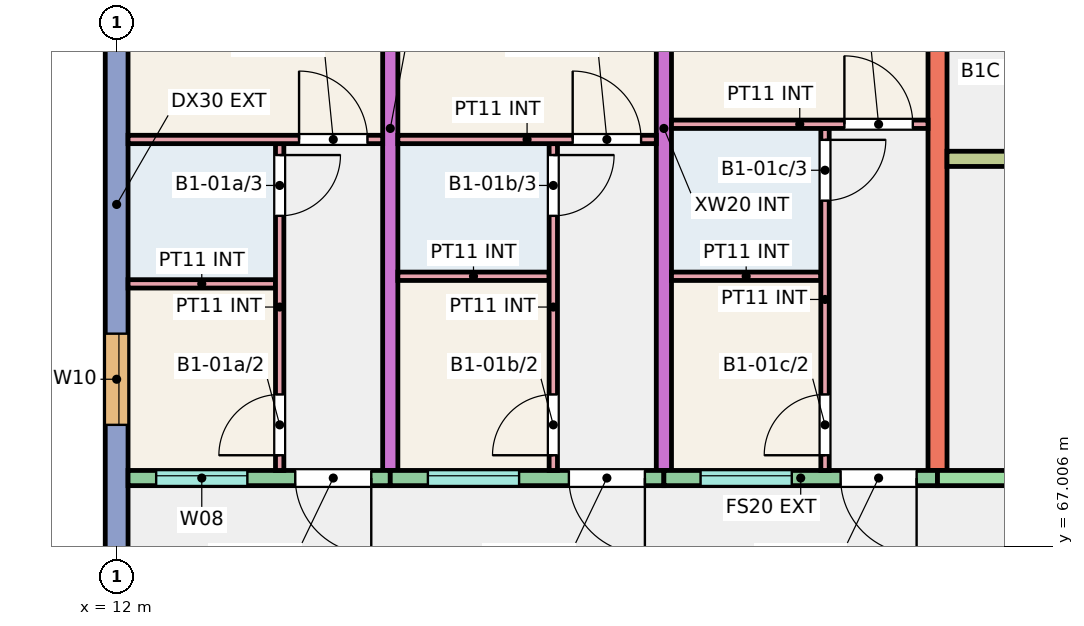
"""IFC4 building model, lengths in metres.
Left out: names, types, materials, properties, quantities, classifications, styles, units other than length and angle.
Written with IfcOpenShell. Run it as: python <this file> out.ifc"""

import sys

from ifc_helpers import new_model, si_unit, direction, frame, frame_2d, origin, place, context, subcontext, project, spatial, rectangle, extrude, element, fill, save


model = new_model("IFC4")
c1 = context("Model", 3, precision=1e-05, world=origin(), true_north=direction((0.0, 1.0)))
c2 = subcontext(c1, "Body", "Model", "MODEL_VIEW")
j1 = project(units=[si_unit("LENGTHUNIT", "METRE"), si_unit("PLANEANGLEUNIT", "RADIAN")], contexts=[c1])
p1 = place(None, origin())
s1 = spatial("IfcSite", under=j1, at=p1, CompositionType="ELEMENT")
p2 = place(p1, origin())
s2 = spatial("IfcBuilding", under=s1, at=p2, CompositionType="ELEMENT")
p3 = place(p2, frame((0.0, 0.0, 3.0)))
s3 = spatial("IfcBuildingStorey", under=s2, at=p3, CompositionType="ELEMENT", Elevation=3.0)
p4 = place(p3, frame((12.0, 66.0, 0.0), z_axis=(0.0, 0.0, 1.0), x_axis=(0.0, 1.0, 0.0)))
e1 = element("IfcWall", 1, at=p4, inside=s3, PredefinedType="SHEAR", context=c2, shape_type="SweptSolid", body=[
    extrude(rectangle(XDim=11.0, YDim=0.3, at=frame_2d((5.5, 0.0))), origin(), (0.0, 0.0, 1.0), 3.0),
])
p5 = place(p4, frame((2.6, 0.0, 0.9)))
e2 = element("IfcOpeningElement", 2, at=p5, cuts=e1, PredefinedType="OPENING", context=c2, shape_type="SweptSolid", body=[
    extrude(rectangle(XDim=1.2, YDim=1.5, at=frame_2d((0.6, 0.75))), frame((0.0, 0.16, 0.0), z_axis=(0.0, -1.0, 0.0), x_axis=(1.0, 0.0, 0.0)), (0.0, 0.0, 1.0), 0.32),
])
p6 = place(p4, frame((7.805, 0.0, 0.9)))
e3 = element("IfcOpeningElement", 3, at=p6, cuts=e1, PredefinedType="OPENING", context=c2, shape_type="SweptSolid", body=[
    extrude(rectangle(XDim=1.8, YDim=1.5, at=frame_2d((0.9, 0.75))), frame((0.0, 0.16, 0.0), z_axis=(0.0, -1.0, 0.0), x_axis=(1.0, 0.0, 0.0)), (0.0, 0.0, 1.0), 0.32),
])
for number, where, z_axis, x_axis in (
    (4, (15.6, 68.0, 0.0), (0.0, 0.0, 1.0), (0.0, 1.0, 0.0)),
    (5, (19.2, 68.0, 0.0), (0.0, 0.0, 1.0), (0.0, 1.0, 0.0)),
):
    element("IfcWall", number, at=place(p3, frame(where, z_axis=z_axis, x_axis=x_axis)), inside=s3, PredefinedType="SHEAR", context=c2, shape_type="SweptSolid", body=[
        extrude(rectangle(XDim=9.0, YDim=0.2, at=frame_2d((4.5, 0.0))), origin(), (0.0, 0.0, 1.0), 3.0),
    ])
p7 = place(p3, frame((22.8, 68.0, 0.0), z_axis=(0.0, 0.0, 1.0), x_axis=(0.0, 1.0, 0.0)))
e6 = element("IfcWall", 6, at=p7, inside=s3, PredefinedType="SHEAR", context=c2, shape_type="SweptSolid", body=[
    extrude(rectangle(XDim=9.0, YDim=0.25, at=frame_2d((4.5, 0.0))), origin(), (0.0, 0.0, 1.0), 3.0),
])
p8 = place(p3, frame((12.15, 67.9, 0.0), z_axis=(0.0, 0.0, 1.0), x_axis=(1.0, 0.0, 0.0)))
e7 = element("IfcWall", 7, at=p8, inside=s3, PredefinedType="SOLIDWALL", context=c2, shape_type="SweptSolid", body=[
    extrude(rectangle(XDim=3.45, YDim=0.2, at=frame_2d((1.725, 0.0))), origin(), (0.0, 0.0, 1.0), 3.0),
])
p9 = place(p8, frame((0.37, 0.0, 1.1)))
e8 = element("IfcOpeningElement", 8, at=p9, cuts=e7, PredefinedType="OPENING", context=c2, shape_type="SweptSolid", body=[
    extrude(rectangle(XDim=1.2, YDim=1.3, at=frame_2d((0.6, 0.65))), frame((0.0, 0.11, 0.0), z_axis=(0.0, -1.0, 0.0), x_axis=(1.0, 0.0, 0.0)), (0.0, 0.0, 1.0), 0.22),
])
p10 = place(p8, frame((2.2, 0.0, 0.0)))
e9 = element("IfcOpeningElement", 9, at=p10, cuts=e7, PredefinedType="OPENING", context=c2, shape_type="SweptSolid", body=[
    extrude(rectangle(XDim=1.0, YDim=2.1, at=frame_2d((0.5, 1.05))), frame((0.0, 0.11, 0.0), z_axis=(0.0, -1.0, 0.0), x_axis=(1.0, 0.0, 0.0)), (0.0, 0.0, 1.0), 0.22),
])
p11 = place(p3, frame((15.6, 67.9, 0.0), z_axis=(0.0, 0.0, 1.0), x_axis=(1.0, 0.0, 0.0)))
e10 = element("IfcWall", 10, at=p11, inside=s3, PredefinedType="SOLIDWALL", context=c2, shape_type="SweptSolid", body=[
    extrude(rectangle(XDim=3.6, YDim=0.2, at=frame_2d((1.8, 0.0))), origin(), (0.0, 0.0, 1.0), 3.0),
])
p12 = place(p11, frame((0.495, 0.0, 1.1)))
e11 = element("IfcOpeningElement", 11, at=p12, cuts=e10, PredefinedType="OPENING", context=c2, shape_type="SweptSolid", body=[
    extrude(rectangle(XDim=1.2, YDim=1.3, at=frame_2d((0.6, 0.65))), frame((0.0, 0.11, 0.0), z_axis=(0.0, -1.0, 0.0), x_axis=(1.0, 0.0, 0.0)), (0.0, 0.0, 1.0), 0.22),
])
p13 = place(p11, frame((2.35, 0.0, 0.0)))
e12 = element("IfcOpeningElement", 12, at=p13, cuts=e10, PredefinedType="OPENING", context=c2, shape_type="SweptSolid", body=[
    extrude(rectangle(XDim=1.0, YDim=2.1, at=frame_2d((0.5, 1.05))), frame((0.0, 0.11, 0.0), z_axis=(0.0, -1.0, 0.0), x_axis=(1.0, 0.0, 0.0)), (0.0, 0.0, 1.0), 0.22),
])
p14 = place(p3, frame((19.2, 67.9, 0.0), z_axis=(0.0, 0.0, 1.0), x_axis=(1.0, 0.0, 0.0)))
e13 = element("IfcWall", 13, at=p14, inside=s3, PredefinedType="SOLIDWALL", context=c2, shape_type="SweptSolid", body=[
    extrude(rectangle(XDim=3.6, YDim=0.2, at=frame_2d((1.8, 0.0))), origin(), (0.0, 0.0, 1.0), 3.0),
])
p15 = place(p14, frame((0.482, 0.0, 1.1)))
e14 = element("IfcOpeningElement", 14, at=p15, cuts=e13, PredefinedType="OPENING", context=c2, shape_type="SweptSolid", body=[
    extrude(rectangle(XDim=1.2, YDim=1.3, at=frame_2d((0.6, 0.65))), frame((0.0, 0.11, 0.0), z_axis=(0.0, -1.0, 0.0), x_axis=(1.0, 0.0, 0.0)), (0.0, 0.0, 1.0), 0.22),
])
p16 = place(p14, frame((2.325, 0.0, 0.0)))
e15 = element("IfcOpeningElement", 15, at=p16, cuts=e13, PredefinedType="OPENING", context=c2, shape_type="SweptSolid", body=[
    extrude(rectangle(XDim=1.0, YDim=2.1, at=frame_2d((0.5, 1.05))), frame((0.0, 0.11, 0.0), z_axis=(0.0, -1.0, 0.0), x_axis=(1.0, 0.0, 0.0)), (0.0, 0.0, 1.0), 0.22),
])
p17 = place(p3, frame((22.8, 67.9, 0.0), z_axis=(0.0, 0.0, 1.0), x_axis=(1.0, 0.0, 0.0)))
e16 = element("IfcWall", 16, at=p17, inside=s3, PredefinedType="SHEAR", context=c2, shape_type="SweptSolid", body=[
    extrude(rectangle(XDim=5.85, YDim=0.2, at=frame_2d((2.925, 0.0))), origin(), (0.0, 0.0, 1.0), 3.0),
])
p18 = place(p17, frame((2.438, 0.0, 0.0)))
e17 = element("IfcOpeningElement", 17, at=p18, cuts=e16, PredefinedType="OPENING", context=c2, shape_type="SweptSolid", body=[
    extrude(rectangle(XDim=1.1, YDim=2.1, at=frame_2d((0.55, 1.05))), frame((0.0, 0.11, 0.0), z_axis=(0.0, -1.0, 0.0), x_axis=(1.0, 0.0, 0.0)), (0.0, 0.0, 1.0), 0.22),
])
p19 = place(p3, frame((22.925, 72.1, 0.0), z_axis=(0.0, 0.0, 1.0), x_axis=(1.0, 0.0, 0.0)))
e18 = element("IfcWall", 18, at=p19, inside=s3, PredefinedType="SHEAR", context=c2, shape_type="SweptSolid", body=[
    extrude(rectangle(XDim=5.725, YDim=0.2, at=frame_2d((2.862, 0.0))), origin(), (0.0, 0.0, 1.0), 3.0),
])
p20 = place(p19, frame((0.95, 0.0, 0.0)))
e19 = element("IfcOpeningElement", 19, at=p20, cuts=e18, PredefinedType="OPENING", context=c2, shape_type="SweptSolid", body=[
    extrude(rectangle(XDim=1.0, YDim=2.1, at=frame_2d((0.5, 1.05))), frame((0.0, 0.11, 0.0), z_axis=(0.0, -1.0, 0.0), x_axis=(1.0, 0.0, 0.0)), (0.0, 0.0, 1.0), 0.22),
])
p21 = place(p19, frame((3.863, 0.0, 0.0)))
e20 = element("IfcOpeningElement", 20, at=p21, cuts=e18, PredefinedType="OPENING", context=c2, shape_type="SweptSolid", body=[
    extrude(rectangle(XDim=1.1, YDim=2.1, at=frame_2d((0.55, 1.05))), frame((0.0, 0.11, 0.0), z_axis=(0.0, -1.0, 0.0), x_axis=(1.0, 0.0, 0.0)), (0.0, 0.0, 1.0), 0.22),
])
p22 = place(p3, frame((12.15, 70.455, 0.0), z_axis=(0.0, 0.0, 1.0), x_axis=(1.0, 0.0, 0.0)))
e21 = element("IfcWall", 21, at=p22, inside=s3, PredefinedType="PARTITIONING", context=c2, shape_type="SweptSolid", body=[
    extrude(rectangle(XDim=1.94, YDim=0.11, at=frame_2d((0.97, 0.0))), origin(), (0.0, 0.0, 1.0), 2.8),
])
p23 = place(p3, frame((14.145, 68.0, 0.0), z_axis=(0.0, 0.0, 1.0), x_axis=(0.0, 1.0, 0.0)))
e22 = element("IfcWall", 22, at=p23, inside=s3, PredefinedType="PARTITIONING", context=c2, shape_type="SweptSolid", body=[
    extrude(rectangle(XDim=4.3, YDim=0.11, at=frame_2d((2.15, 0.0))), origin(), (0.0, 0.0, 1.0), 2.8),
])
p24 = place(p23, frame((0.2, 0.0, 0.0)))
e23 = element("IfcOpeningElement", 23, at=p24, cuts=e22, PredefinedType="OPENING", context=c2, shape_type="SweptSolid", body=[
    extrude(rectangle(XDim=0.8, YDim=2.1, at=frame_2d((0.4, 1.05))), frame((0.0, 0.065, 0.0), z_axis=(0.0, -1.0, 0.0), x_axis=(1.0, 0.0, 0.0)), (0.0, 0.0, 1.0), 0.13),
])
p25 = place(p23, frame((3.35, 0.0, 0.0)))
e24 = element("IfcOpeningElement", 24, at=p25, cuts=e22, PredefinedType="OPENING", context=c2, shape_type="SweptSolid", body=[
    extrude(rectangle(XDim=0.8, YDim=2.1, at=frame_2d((0.4, 1.05))), frame((0.0, 0.065, 0.0), z_axis=(0.0, -1.0, 0.0), x_axis=(1.0, 0.0, 0.0)), (0.0, 0.0, 1.0), 0.13),
])
p26 = place(p3, frame((12.15, 72.355, 0.0), z_axis=(0.0, 0.0, 1.0), x_axis=(1.0, 0.0, 0.0)))
e25 = element("IfcWall", 25, at=p26, inside=s3, PredefinedType="PARTITIONING", context=c2, shape_type="SweptSolid", body=[
    extrude(rectangle(XDim=3.35, YDim=0.11, at=frame_2d((1.675, 0.0))), origin(), (0.0, 0.0, 1.0), 2.8),
])
p27 = place(p26, frame((2.25, 0.0, 0.0)))
e26 = element("IfcOpeningElement", 26, at=p27, cuts=e25, PredefinedType="OPENING", context=c2, shape_type="SweptSolid", body=[
    extrude(rectangle(XDim=0.9, YDim=2.1, at=frame_2d((0.45, 1.05))), frame((0.0, 0.065, 0.0), z_axis=(0.0, -1.0, 0.0), x_axis=(1.0, 0.0, 0.0)), (0.0, 0.0, 1.0), 0.13),
])
p28 = place(p3, frame((15.7, 70.555, 0.0), z_axis=(0.0, 0.0, 1.0), x_axis=(1.0, 0.0, 0.0)))
e27 = element("IfcWall", 27, at=p28, inside=s3, PredefinedType="PARTITIONING", context=c2, shape_type="SweptSolid", body=[
    extrude(rectangle(XDim=1.99, YDim=0.11, at=frame_2d((0.995, 0.0))), origin(), (0.0, 0.0, 1.0), 2.8),
])
p29 = place(p3, frame((17.745, 68.0, 0.0), z_axis=(0.0, 0.0, 1.0), x_axis=(0.0, 1.0, 0.0)))
e28 = element("IfcWall", 28, at=p29, inside=s3, PredefinedType="PARTITIONING", context=c2, shape_type="SweptSolid", body=[
    extrude(rectangle(XDim=4.3, YDim=0.11, at=frame_2d((2.15, 0.0))), origin(), (0.0, 0.0, 1.0), 2.8),
])
p30 = place(p29, frame((0.2, 0.0, 0.0)))
e29 = element("IfcOpeningElement", 29, at=p30, cuts=e28, PredefinedType="OPENING", context=c2, shape_type="SweptSolid", body=[
    extrude(rectangle(XDim=0.8, YDim=2.1, at=frame_2d((0.4, 1.05))), frame((0.0, 0.065, 0.0), z_axis=(0.0, -1.0, 0.0), x_axis=(1.0, 0.0, 0.0)), (0.0, 0.0, 1.0), 0.13),
])
p31 = place(p29, frame((3.35, 0.0, 0.0)))
e30 = element("IfcOpeningElement", 30, at=p31, cuts=e28, PredefinedType="OPENING", context=c2, shape_type="SweptSolid", body=[
    extrude(rectangle(XDim=0.8, YDim=2.1, at=frame_2d((0.4, 1.05))), frame((0.0, 0.065, 0.0), z_axis=(0.0, -1.0, 0.0), x_axis=(1.0, 0.0, 0.0)), (0.0, 0.0, 1.0), 0.13),
])
p32 = place(p3, frame((15.7, 72.355, 0.0), z_axis=(0.0, 0.0, 1.0), x_axis=(1.0, 0.0, 0.0)))
e31 = element("IfcWall", 31, at=p32, inside=s3, PredefinedType="PARTITIONING", context=c2, shape_type="SweptSolid", body=[
    extrude(rectangle(XDim=3.4, YDim=0.11, at=frame_2d((1.7, 0.0))), origin(), (0.0, 0.0, 1.0), 2.8),
])
p33 = place(p32, frame((2.3, 0.0, 0.0)))
e32 = element("IfcOpeningElement", 32, at=p33, cuts=e31, PredefinedType="OPENING", context=c2, shape_type="SweptSolid", body=[
    extrude(rectangle(XDim=0.9, YDim=2.1, at=frame_2d((0.45, 1.05))), frame((0.0, 0.065, 0.0), z_axis=(0.0, -1.0, 0.0), x_axis=(1.0, 0.0, 0.0)), (0.0, 0.0, 1.0), 0.13),
])
p34 = place(p3, frame((19.3, 70.555, 0.0), z_axis=(0.0, 0.0, 1.0), x_axis=(1.0, 0.0, 0.0)))
e33 = element("IfcWall", 33, at=p34, inside=s3, PredefinedType="PARTITIONING", context=c2, shape_type="SweptSolid", body=[
    extrude(rectangle(XDim=1.965, YDim=0.11, at=frame_2d((0.982, 0.0))), origin(), (0.0, 0.0, 1.0), 2.8),
])
p35 = place(p3, frame((21.32, 68.0, 0.0), z_axis=(0.0, 0.0, 1.0), x_axis=(0.0, 1.0, 0.0)))
e34 = element("IfcWall", 34, at=p35, inside=s3, PredefinedType="PARTITIONING", context=c2, shape_type="SweptSolid", body=[
    extrude(rectangle(XDim=4.5, YDim=0.11, at=frame_2d((2.25, 0.0))), origin(), (0.0, 0.0, 1.0), 2.8),
])
p36 = place(p35, frame((0.2, 0.0, 0.0)))
e35 = element("IfcOpeningElement", 35, at=p36, cuts=e34, PredefinedType="OPENING", context=c2, shape_type="SweptSolid", body=[
    extrude(rectangle(XDim=0.8, YDim=2.1, at=frame_2d((0.4, 1.05))), frame((0.0, 0.065, 0.0), z_axis=(0.0, -1.0, 0.0), x_axis=(1.0, 0.0, 0.0)), (0.0, 0.0, 1.0), 0.13),
])
p37 = place(p35, frame((3.55, 0.0, 0.0)))
e36 = element("IfcOpeningElement", 36, at=p37, cuts=e34, PredefinedType="OPENING", context=c2, shape_type="SweptSolid", body=[
    extrude(rectangle(XDim=0.8, YDim=2.1, at=frame_2d((0.4, 1.05))), frame((0.0, 0.065, 0.0), z_axis=(0.0, -1.0, 0.0), x_axis=(1.0, 0.0, 0.0)), (0.0, 0.0, 1.0), 0.13),
])
p38 = place(p3, frame((19.3, 72.555, 0.0), z_axis=(0.0, 0.0, 1.0), x_axis=(1.0, 0.0, 0.0)))
e37 = element("IfcWall", 37, at=p38, inside=s3, PredefinedType="PARTITIONING", context=c2, shape_type="SweptSolid", body=[
    extrude(rectangle(XDim=3.375, YDim=0.11, at=frame_2d((1.688, 0.0))), origin(), (0.0, 0.0, 1.0), 2.8),
])
p39 = place(p38, frame((2.275, 0.0, 0.0)))
e38 = element("IfcOpeningElement", 38, at=p39, cuts=e37, PredefinedType="OPENING", context=c2, shape_type="SweptSolid", body=[
    extrude(rectangle(XDim=0.9, YDim=2.1, at=frame_2d((0.45, 1.05))), frame((0.0, 0.065, 0.0), z_axis=(0.0, -1.0, 0.0), x_axis=(1.0, 0.0, 0.0)), (0.0, 0.0, 1.0), 0.13),
])
p40 = place(p9, origin())
e39 = element("IfcWindow", 39, at=p40, inside=s3, PartitioningType="SINGLE_PANEL", PredefinedType="WINDOW", context=c2, shape_type="SweptSolid", body=[
    extrude(rectangle(XDim=1.2, YDim=1.3, at=frame_2d((0.6, 0.65))), frame((0.0, 0.06, 0.0), z_axis=(0.0, -1.0, 0.0), x_axis=(1.0, 0.0, 0.0)), (0.0, 0.0, 1.0), 0.06),
])
fill(e8, e39)
p41 = place(p5, origin())
e40 = element("IfcWindow", 40, at=p41, inside=s3, PartitioningType="SINGLE_PANEL", PredefinedType="WINDOW", context=c2, shape_type="SweptSolid", body=[
    extrude(rectangle(XDim=1.2, YDim=1.5, at=frame_2d((0.6, 0.75))), frame((0.0, 0.0, 0.0), z_axis=(0.0, -1.0, 0.0), x_axis=(1.0, 0.0, 0.0)), (0.0, 0.0, 1.0), 0.06),
])
fill(e2, e40)
p42 = place(p12, origin())
e41 = element("IfcWindow", 41, at=p42, inside=s3, PartitioningType="SINGLE_PANEL", PredefinedType="WINDOW", context=c2, shape_type="SweptSolid", body=[
    extrude(rectangle(XDim=1.2, YDim=1.3, at=frame_2d((0.6, 0.65))), frame((0.0, 0.06, 0.0), z_axis=(0.0, -1.0, 0.0), x_axis=(1.0, 0.0, 0.0)), (0.0, 0.0, 1.0), 0.06),
])
fill(e11, e41)
p43 = place(p15, origin())
e42 = element("IfcWindow", 42, at=p43, inside=s3, PartitioningType="SINGLE_PANEL", PredefinedType="WINDOW", context=c2, shape_type="SweptSolid", body=[
    extrude(rectangle(XDim=1.2, YDim=1.3, at=frame_2d((0.6, 0.65))), frame((0.0, 0.06, 0.0), z_axis=(0.0, -1.0, 0.0), x_axis=(1.0, 0.0, 0.0)), (0.0, 0.0, 1.0), 0.06),
])
fill(e14, e42)
p44 = place(p10, origin())
e43 = element("IfcDoor", 43, at=p44, inside=s3, OperationType="SINGLE_SWING_RIGHT", PredefinedType="DOOR", context=c2, shape_type="SweptSolid", body=[
    extrude(rectangle(XDim=1.0, YDim=2.1, at=frame_2d((0.5, 1.05))), frame((0.0, 0.025, 0.0), z_axis=(0.0, -1.0, 0.0), x_axis=(1.0, 0.0, 0.0)), (0.0, 0.0, 1.0), 0.05),
])
fill(e9, e43)
p45 = place(p24, origin())
e44 = element("IfcDoor", 44, at=p45, inside=s3, OperationType="SINGLE_SWING_LEFT", PredefinedType="DOOR", context=c2, shape_type="SweptSolid", body=[
    extrude(rectangle(XDim=0.8, YDim=2.1, at=frame_2d((0.4, 1.05))), frame((0.0, 0.025, 0.0), z_axis=(0.0, -1.0, 0.0), x_axis=(1.0, 0.0, 0.0)), (0.0, 0.0, 1.0), 0.05),
])
fill(e23, e44)
p46 = place(p25, origin())
e45 = element("IfcDoor", 45, at=p46, inside=s3, OperationType="SINGLE_SWING_RIGHT", PredefinedType="DOOR", context=c2, shape_type="SweptSolid", body=[
    extrude(rectangle(XDim=0.8, YDim=2.1, at=frame_2d((0.4, 1.05))), frame((0.0, 0.025, 0.0), z_axis=(0.0, -1.0, 0.0), x_axis=(1.0, 0.0, 0.0)), (0.0, 0.0, 1.0), 0.05),
])
fill(e24, e45)
p47 = place(p27, origin())
e46 = element("IfcDoor", 46, at=p47, inside=s3, OperationType="SINGLE_SWING_LEFT", PredefinedType="DOOR", context=c2, shape_type="SweptSolid", body=[
    extrude(rectangle(XDim=0.9, YDim=2.1, at=frame_2d((0.45, 1.05))), frame((0.0, 0.025, 0.0), z_axis=(0.0, -1.0, 0.0), x_axis=(1.0, 0.0, 0.0)), (0.0, 0.0, 1.0), 0.05),
])
fill(e26, e46)
p48 = place(p13, origin())
e47 = element("IfcDoor", 47, at=p48, inside=s3, OperationType="SINGLE_SWING_RIGHT", PredefinedType="DOOR", context=c2, shape_type="SweptSolid", body=[
    extrude(rectangle(XDim=1.0, YDim=2.1, at=frame_2d((0.5, 1.05))), frame((0.0, 0.025, 0.0), z_axis=(0.0, -1.0, 0.0), x_axis=(1.0, 0.0, 0.0)), (0.0, 0.0, 1.0), 0.05),
])
fill(e12, e47)
p49 = place(p30, origin())
e48 = element("IfcDoor", 48, at=p49, inside=s3, OperationType="SINGLE_SWING_LEFT", PredefinedType="DOOR", context=c2, shape_type="SweptSolid", body=[
    extrude(rectangle(XDim=0.8, YDim=2.1, at=frame_2d((0.4, 1.05))), frame((0.0, 0.025, 0.0), z_axis=(0.0, -1.0, 0.0), x_axis=(1.0, 0.0, 0.0)), (0.0, 0.0, 1.0), 0.05),
])
fill(e29, e48)
p50 = place(p31, origin())
e49 = element("IfcDoor", 49, at=p50, inside=s3, OperationType="SINGLE_SWING_RIGHT", PredefinedType="DOOR", context=c2, shape_type="SweptSolid", body=[
    extrude(rectangle(XDim=0.8, YDim=2.1, at=frame_2d((0.4, 1.05))), frame((0.0, 0.025, 0.0), z_axis=(0.0, -1.0, 0.0), x_axis=(1.0, 0.0, 0.0)), (0.0, 0.0, 1.0), 0.05),
])
fill(e30, e49)
p51 = place(p33, origin())
e50 = element("IfcDoor", 50, at=p51, inside=s3, OperationType="SINGLE_SWING_LEFT", PredefinedType="DOOR", context=c2, shape_type="SweptSolid", body=[
    extrude(rectangle(XDim=0.9, YDim=2.1, at=frame_2d((0.45, 1.05))), frame((0.0, 0.025, 0.0), z_axis=(0.0, -1.0, 0.0), x_axis=(1.0, 0.0, 0.0)), (0.0, 0.0, 1.0), 0.05),
])
fill(e32, e50)
p52 = place(p16, origin())
e51 = element("IfcDoor", 51, at=p52, inside=s3, OperationType="SINGLE_SWING_RIGHT", PredefinedType="DOOR", context=c2, shape_type="SweptSolid", body=[
    extrude(rectangle(XDim=1.0, YDim=2.1, at=frame_2d((0.5, 1.05))), frame((0.0, 0.025, 0.0), z_axis=(0.0, -1.0, 0.0), x_axis=(1.0, 0.0, 0.0)), (0.0, 0.0, 1.0), 0.05),
])
fill(e15, e51)
p53 = place(p36, origin())
e52 = element("IfcDoor", 52, at=p53, inside=s3, OperationType="SINGLE_SWING_LEFT", PredefinedType="DOOR", context=c2, shape_type="SweptSolid", body=[
    extrude(rectangle(XDim=0.8, YDim=2.1, at=frame_2d((0.4, 1.05))), frame((0.0, 0.025, 0.0), z_axis=(0.0, -1.0, 0.0), x_axis=(1.0, 0.0, 0.0)), (0.0, 0.0, 1.0), 0.05),
])
fill(e35, e52)
p54 = place(p37, origin())
e53 = element("IfcDoor", 53, at=p54, inside=s3, OperationType="SINGLE_SWING_RIGHT", PredefinedType="DOOR", context=c2, shape_type="SweptSolid", body=[
    extrude(rectangle(XDim=0.8, YDim=2.1, at=frame_2d((0.4, 1.05))), frame((0.0, 0.025, 0.0), z_axis=(0.0, -1.0, 0.0), x_axis=(1.0, 0.0, 0.0)), (0.0, 0.0, 1.0), 0.05),
])
fill(e36, e53)
p55 = place(p39, origin())
e54 = element("IfcDoor", 54, at=p55, inside=s3, OperationType="SINGLE_SWING_LEFT", PredefinedType="DOOR", context=c2, shape_type="SweptSolid", body=[
    extrude(rectangle(XDim=0.9, YDim=2.1, at=frame_2d((0.45, 1.05))), frame((0.0, 0.025, 0.0), z_axis=(0.0, -1.0, 0.0), x_axis=(1.0, 0.0, 0.0)), (0.0, 0.0, 1.0), 0.05),
])
fill(e38, e54)
save(model, sys.argv[1])
